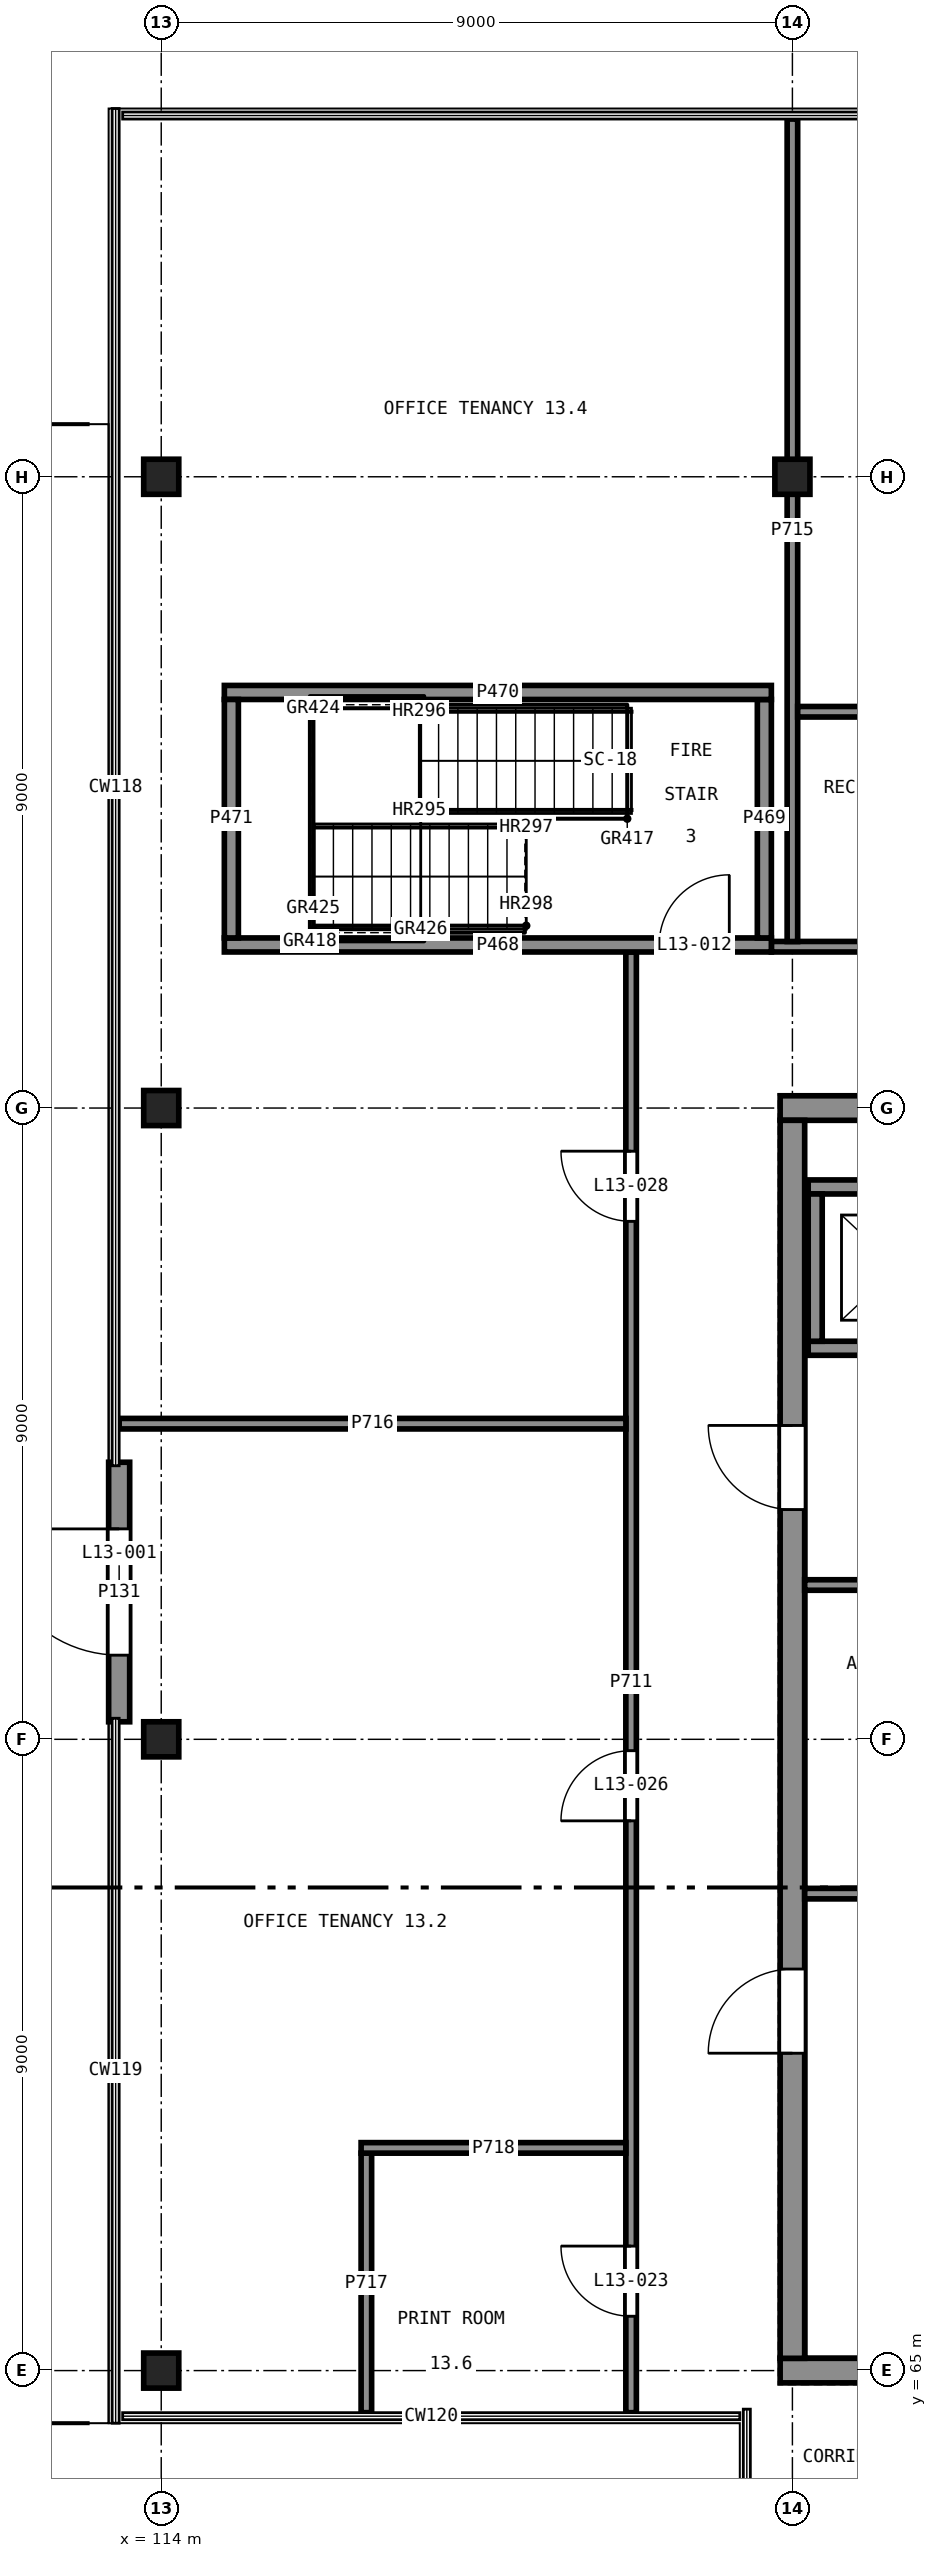
"""IFC4 building model, lengths in metres.
Left out: names, types, materials, properties, quantities, classifications, styles, units other than length and angle.
Written with IfcOpenShell. Run it as: python <this file> out.ifc"""

import sys

from ifc_helpers import new_model, si_unit, direction, frame, frame_2d, origin, origin_2d, place, context, subcontext, project, spatial, rectangle, extrude, element, fill, save


model = new_model("IFC4")
c1 = context("Model", 3, precision=1e-05, world=origin(), true_north=direction((0.0, 1.0)))
c2 = subcontext(c1, "Body", "Model", "MODEL_VIEW")
j1 = project(units=[si_unit("LENGTHUNIT", "METRE"), si_unit("PLANEANGLEUNIT", "RADIAN")], contexts=[c1])
p1 = place(None, origin())
s1 = spatial("IfcSite", under=j1, at=p1, CompositionType="ELEMENT")
p2 = place(p1, origin())
s2 = spatial("IfcBuilding", under=s1, at=p2, CompositionType="ELEMENT")
p3 = place(p2, frame((0.0, 0.0, 53.5)))
s3 = spatial("IfcBuildingStorey", under=s2, at=p3, CompositionType="ELEMENT", Elevation=53.5)
for number, where, z_axis, x_axis in (
    (1, (114.0, 65.0, 0.0), (0.0, 0.0, 1.0), (1.0, 0.0, 0.0)),
    (2, (114.0, 74.0, 0.0), (0.0, 0.0, 1.0), (1.0, 0.0, 0.0)),
    (3, (114.0, 83.0, 0.0), (0.0, 0.0, 1.0), (1.0, 0.0, 0.0)),
    (4, (114.0, 92.0, 0.0), (0.0, 0.0, 1.0), (1.0, 0.0, 0.0)),
    (5, (123.0, 92.0, 0.0), (0.0, 0.0, 1.0), (1.0, 0.0, 0.0)),
):
    element("IfcColumn", number, at=place(p3, frame(where, z_axis=z_axis, x_axis=x_axis)), inside=s3, PredefinedType="COLUMN", context=c2, shape_type="SweptSolid", body=[
        extrude(rectangle(XDim=0.5, YDim=0.5, at=origin_2d()), origin(), (0.0, 0.0, 1.0), 4.0),
    ])
for number, where, z_axis, x_axis in (
    (6, (122.825, 65.0, 0.0), (0.0, 0.0, 1.0), (1.0, 0.0, 0.0)),
    (7, (141.175, 83.0, 0.0), (0.0, 0.0, 1.0), (-1.0, 0.0, 0.0)),
):
    element("IfcWall", number, at=place(p3, frame(where, z_axis=z_axis, x_axis=x_axis)), inside=s3, PredefinedType="SHEAR", context=c2, shape_type="SweptSolid", body=[
        extrude(rectangle(XDim=18.35, YDim=0.35, at=frame_2d((9.175, 0.0))), origin(), (0.0, 0.0, 1.0), 4.0),
    ])
p4 = place(p3, frame((123.0, 82.825, 0.0), z_axis=(0.0, 0.0, 1.0), x_axis=(0.0, -1.0, 0.0)))
e8 = element("IfcWall", 8, at=p4, inside=s3, PredefinedType="SHEAR", context=c2, shape_type="SweptSolid", body=[
    extrude(rectangle(XDim=17.65, YDim=0.35, at=frame_2d((8.825, 0.0))), origin(), (0.0, 0.0, 1.0), 4.0),
])
p5 = place(p4, frame((12.1, 0.0, 0.0)))
e9 = element("IfcOpeningElement", 9, at=p5, cuts=e8, PredefinedType="OPENING", context=c2, shape_type="SweptSolid", body=[
    extrude(rectangle(XDim=1.2, YDim=2.1, at=frame_2d((0.6, 1.05))), frame((0.0, 0.185, 0.0), z_axis=(0.0, -1.0, 0.0), x_axis=(1.0, 0.0, 0.0)), (0.0, 0.0, 1.0), 0.37),
])
p6 = place(p4, frame((4.35, 0.0, 0.0)))
e10 = element("IfcOpeningElement", 10, at=p6, cuts=e8, PredefinedType="OPENING", context=c2, shape_type="SweptSolid", body=[
    extrude(rectangle(XDim=1.2, YDim=2.1, at=frame_2d((0.6, 1.05))), frame((0.0, 0.185, 0.0), z_axis=(0.0, -1.0, 0.0), x_axis=(1.0, 0.0, 0.0)), (0.0, 0.0, 1.0), 0.37),
])
p7 = place(p3, frame((113.4, 77.95, 0.0), z_axis=(0.0, 0.0, 1.0), x_axis=(0.0, -1.0, 0.0)))
e11 = element("IfcWall", 11, at=p7, inside=s3, PredefinedType="SOLIDWALL", context=c2, shape_type="SweptSolid", body=[
    extrude(rectangle(XDim=3.7, YDim=0.3, at=frame_2d((1.85, 0.0))), origin(), (0.0, 0.0, 1.0), 3.75),
])
p8 = place(p7, frame((0.95, 0.0, 0.0)))
e12 = element("IfcOpeningElement", 12, at=p8, cuts=e11, PredefinedType="OPENING", context=c2, shape_type="SweptSolid", body=[
    extrude(rectangle(XDim=1.8, YDim=2.4, at=frame_2d((0.9, 1.2))), frame((0.0, 0.16, 0.0), z_axis=(0.0, -1.0, 0.0), x_axis=(1.0, 0.0, 0.0)), (0.0, 0.0, 1.0), 0.32),
])
p9 = place(p3, frame((123.225, 79.575, 0.0), z_axis=(0.0, 0.0, 1.0), x_axis=(1.0, 0.0, 0.0)))
e13 = element("IfcWall", 13, at=p9, inside=s3, PredefinedType="SHEAR", context=c2, shape_type="SweptSolid", body=[
    extrude(rectangle(XDim=2.55, YDim=0.2, at=frame_2d((1.275, 0.0))), origin(), (0.0, 0.0, 1.0), 4.0),
])
p10 = place(p9, frame((0.725, 0.0, 0.0)))
e14 = element("IfcOpeningElement", 14, at=p10, cuts=e13, PredefinedType="OPENING", context=c2, shape_type="SweptSolid", body=[
    extrude(rectangle(XDim=1.1, YDim=2.1, at=frame_2d((0.55, 1.05))), frame((0.0, 0.11, 0.0), z_axis=(0.0, -1.0, 0.0), x_axis=(1.0, 0.0, 0.0)), (0.0, 0.0, 1.0), 0.22),
])
p11 = place(p3, frame((125.775, 81.875, 0.0), z_axis=(0.0, 0.0, 1.0), x_axis=(-1.0, 0.0, 0.0)))
e15 = element("IfcWall", 15, at=p11, inside=s3, PredefinedType="SHEAR", context=c2, shape_type="SweptSolid", body=[
    extrude(rectangle(XDim=2.55, YDim=0.2, at=frame_2d((1.275, 0.0))), origin(), (0.0, 0.0, 1.0), 4.0),
])
p12 = place(p3, frame((123.325, 81.775, 0.0), z_axis=(0.0, 0.0, 1.0), x_axis=(0.0, -1.0, 0.0)))
e16 = element("IfcWall", 16, at=p12, inside=s3, PredefinedType="SHEAR", context=c2, shape_type="SweptSolid", body=[
    extrude(rectangle(XDim=2.1, YDim=0.2, at=frame_2d((1.05, 0.0))), origin(), (0.0, 0.0, 1.0), 4.0),
])
p13 = place(p3, frame((114.9, 85.325, 0.0), z_axis=(0.0, 0.0, 1.0), x_axis=(1.0, 0.0, 0.0)))
e17 = element("IfcWall", 17, at=p13, inside=s3, PredefinedType="SHEAR", context=c2, shape_type="SweptSolid", body=[
    extrude(rectangle(XDim=7.8, YDim=0.2, at=frame_2d((3.9, 0.0))), origin(), (0.0, 0.0, 1.0), 3.75),
])
p14 = place(p13, frame((6.2, 0.0, 0.0)))
e18 = element("IfcOpeningElement", 18, at=p14, cuts=e17, PredefinedType="OPENING", context=c2, shape_type="SweptSolid", body=[
    extrude(rectangle(XDim=1.0, YDim=2.1, at=frame_2d((0.5, 1.05))), frame((0.0, 0.11, 0.0), z_axis=(0.0, -1.0, 0.0), x_axis=(1.0, 0.0, 0.0)), (0.0, 0.0, 1.0), 0.22),
])
p15 = place(p3, frame((122.6, 85.425, 0.0), z_axis=(0.0, 0.0, 1.0), x_axis=(0.0, 1.0, 0.0)))
e19 = element("IfcWall", 19, at=p15, inside=s3, PredefinedType="SHEAR", context=c2, shape_type="SweptSolid", body=[
    extrude(rectangle(XDim=3.4, YDim=0.2, at=frame_2d((1.7, 0.0))), origin(), (0.0, 0.0, 1.0), 3.75),
])
p16 = place(p3, frame((122.7, 88.925, 0.0), z_axis=(0.0, 0.0, 1.0), x_axis=(-1.0, 0.0, 0.0)))
e20 = element("IfcWall", 20, at=p16, inside=s3, PredefinedType="SHEAR", context=c2, shape_type="SweptSolid", body=[
    extrude(rectangle(XDim=7.8, YDim=0.2, at=frame_2d((3.9, 0.0))), origin(), (0.0, 0.0, 1.0), 3.75),
])
p17 = place(p3, frame((115.0, 88.825, 0.0), z_axis=(0.0, 0.0, 1.0), x_axis=(0.0, -1.0, 0.0)))
e21 = element("IfcWall", 21, at=p17, inside=s3, PredefinedType="SHEAR", context=c2, shape_type="SweptSolid", body=[
    extrude(rectangle(XDim=3.4, YDim=0.2, at=frame_2d((1.7, 0.0))), origin(), (0.0, 0.0, 1.0), 3.75),
])
p18 = place(p3, frame((123.175, 71.8, 0.0), z_axis=(0.0, 0.0, 1.0), x_axis=(1.0, 0.0, 0.0)))
e22 = element("IfcWall", 22, at=p18, inside=s3, PredefinedType="PARTITIONING", context=c2, shape_type="SweptSolid", body=[
    extrude(rectangle(XDim=2.575, YDim=0.15, at=frame_2d((1.288, 0.0))), origin(), (0.0, 0.0, 1.0), 3.75),
])
p19 = place(p18, frame((0.85, 0.0, 0.0)))
e23 = element("IfcOpeningElement", 23, at=p19, cuts=e22, PredefinedType="OPENING", context=c2, shape_type="SweptSolid", body=[
    extrude(rectangle(XDim=1.0, YDim=2.1, at=frame_2d((0.5, 1.05))), frame((0.0, 0.085, 0.0), z_axis=(0.0, -1.0, 0.0), x_axis=(1.0, 0.0, 0.0)), (0.0, 0.0, 1.0), 0.17),
])
p20 = place(p3, frame((123.175, 76.2, 0.0), z_axis=(0.0, 0.0, 1.0), x_axis=(1.0, 0.0, 0.0)))
e24 = element("IfcWall", 24, at=p20, inside=s3, PredefinedType="PARTITIONING", context=c2, shape_type="SweptSolid", body=[
    extrude(rectangle(XDim=2.575, YDim=0.15, at=frame_2d((1.288, 0.0))), origin(), (0.0, 0.0, 1.0), 3.75),
])
p21 = place(p3, frame((120.7, 64.4, 0.0), z_axis=(0.0, 0.0, 1.0), x_axis=(0.0, 1.0, 0.0)))
e25 = element("IfcWall", 25, at=p21, inside=s3, PredefinedType="PARTITIONING", context=c2, shape_type="SweptSolid", body=[
    extrude(rectangle(XDim=20.825, YDim=0.15, at=frame_2d((10.413, 0.0))), origin(), (0.0, 0.0, 1.0), 3.75),
])
p22 = place(p21, frame((1.375, 0.0, 0.0)))
e26 = element("IfcOpeningElement", 26, at=p22, cuts=e25, PredefinedType="OPENING", context=c2, shape_type="SweptSolid", body=[
    extrude(rectangle(XDim=1.0, YDim=2.1, at=frame_2d((0.5, 1.05))), frame((0.0, 0.085, 0.0), z_axis=(0.0, -1.0, 0.0), x_axis=(1.0, 0.0, 0.0)), (0.0, 0.0, 1.0), 0.17),
])
p23 = place(p21, frame((8.438, 0.0, 0.0)))
e27 = element("IfcOpeningElement", 27, at=p23, cuts=e25, PredefinedType="OPENING", context=c2, shape_type="SweptSolid", body=[
    extrude(rectangle(XDim=1.0, YDim=2.1, at=frame_2d((0.5, 1.05))), frame((0.0, 0.085, 0.0), z_axis=(0.0, -1.0, 0.0), x_axis=(1.0, 0.0, 0.0)), (0.0, 0.0, 1.0), 0.17),
])
p24 = place(p21, frame((16.985, 0.0, 0.0)))
e28 = element("IfcOpeningElement", 28, at=p24, cuts=e25, PredefinedType="OPENING", context=c2, shape_type="SweptSolid", body=[
    extrude(rectangle(XDim=1.0, YDim=2.1, at=frame_2d((0.5, 1.05))), frame((0.0, 0.085, 0.0), z_axis=(0.0, -1.0, 0.0), x_axis=(1.0, 0.0, 0.0)), (0.0, 0.0, 1.0), 0.17),
])
p25 = place(p3, frame((122.7, 85.3, 0.0), z_axis=(0.0, 0.0, 1.0), x_axis=(1.0, 0.0, 0.0)))
e29 = element("IfcWall", 29, at=p25, inside=s3, PredefinedType="PARTITIONING", context=c2, shape_type="SweptSolid", body=[
    extrude(rectangle(XDim=9.9, YDim=0.15, at=frame_2d((4.95, 0.0))), origin(), (0.0, 0.0, 1.0), 3.75),
])
p26 = place(p25, frame((1.875, 0.0, 0.0)))
e30 = element("IfcOpeningElement", 30, at=p26, cuts=e29, PredefinedType="OPENING", context=c2, shape_type="SweptSolid", body=[
    extrude(rectangle(XDim=1.0, YDim=2.1, at=frame_2d((0.5, 1.05))), frame((0.0, 0.085, 0.0), z_axis=(0.0, -1.0, 0.0), x_axis=(1.0, 0.0, 0.0)), (0.0, 0.0, 1.0), 0.17),
])
p27 = place(p25, frame((6.698, 0.0, 0.0)))
e31 = element("IfcOpeningElement", 31, at=p27, cuts=e29, PredefinedType="OPENING", context=c2, shape_type="SweptSolid", body=[
    extrude(rectangle(XDim=1.0, YDim=2.1, at=frame_2d((0.5, 1.05))), frame((0.0, 0.085, 0.0), z_axis=(0.0, -1.0, 0.0), x_axis=(1.0, 0.0, 0.0)), (0.0, 0.0, 1.0), 0.17),
])
p28 = place(p3, frame((123.0, 85.374, 0.0), z_axis=(0.0, 0.0, 1.0), x_axis=(0.0, 1.0, 0.0)))
e32 = element("IfcWall", 32, at=p28, inside=s3, PredefinedType="PARTITIONING", context=c2, shape_type="SweptSolid", body=[
    extrude(rectangle(XDim=11.726, YDim=0.15, at=frame_2d((5.863, 0.0))), origin(), (0.0, 0.0, 1.0), 2.85),
])
p29 = place(p3, frame((113.4, 78.5, 0.0), z_axis=(0.0, 0.0, 1.0), x_axis=(1.0, 0.0, 0.0)))
e33 = element("IfcWall", 33, at=p29, inside=s3, PredefinedType="PARTITIONING", context=c2, shape_type="SweptSolid", body=[
    extrude(rectangle(XDim=7.226, YDim=0.15, at=frame_2d((3.613, 0.0))), origin(), (0.0, 0.0, 1.0), 3.75),
])
p30 = place(p3, frame((116.925, 64.4, 0.0), z_axis=(0.0, 0.0, 1.0), x_axis=(0.0, 1.0, 0.0)))
e34 = element("IfcWall", 34, at=p30, inside=s3, PredefinedType="PARTITIONING", context=c2, shape_type="SweptSolid", body=[
    extrude(rectangle(XDim=3.7, YDim=0.15, at=frame_2d((1.85, 0.0))), origin(), (0.0, 0.0, 1.0), 3.75),
])
p31 = place(p3, frame((120.625, 68.175, 0.0), z_axis=(0.0, 0.0, 1.0), x_axis=(-1.0, 0.0, 0.0)))
e35 = element("IfcWall", 35, at=p31, inside=s3, PredefinedType="PARTITIONING", context=c2, shape_type="SweptSolid", body=[
    extrude(rectangle(XDim=3.775, YDim=0.15, at=frame_2d((1.887, 0.0))), origin(), (0.0, 0.0, 1.0), 3.75),
])
p32 = place(p3, frame((123.075, 88.65, 0.0), z_axis=(0.0, 0.0, 1.0), x_axis=(1.0, 0.0, 0.0)))
e36 = element("IfcWall", 36, at=p32, inside=s3, PredefinedType="PARTITIONING", context=c2, shape_type="SweptSolid", body=[
    extrude(rectangle(XDim=4.0, YDim=0.15, at=frame_2d((2.0, 0.0))), origin(), (0.0, 0.0, 1.0), 3.75),
])
p33 = place(p8, frame((1.8, 0.0, 0.0), z_axis=(0.0, 0.0, 1.0), x_axis=(-1.0, 0.0, 0.0)))
e37 = element("IfcDoor", 37, at=p33, inside=s3, OperationType="DOUBLE_DOOR_SINGLE_SWING", PredefinedType="DOOR", context=c2, shape_type="SweptSolid", body=[
    extrude(rectangle(XDim=1.8, YDim=2.4, at=frame_2d((0.9, 1.2))), frame((0.0, 0.025, 0.0), z_axis=(0.0, -1.0, 0.0), x_axis=(1.0, 0.0, 0.0)), (0.0, 0.0, 1.0), 0.05),
])
fill(e12, e37)
p34 = place(p14, origin())
e38 = element("IfcDoor", 38, at=p34, inside=s3, OperationType="SINGLE_SWING_LEFT", PredefinedType="DOOR", context=c2, shape_type="SweptSolid", body=[
    extrude(rectangle(XDim=1.0, YDim=2.1, at=frame_2d((0.5, 1.05))), frame((0.0, 0.025, 0.0), z_axis=(0.0, -1.0, 0.0), x_axis=(1.0, 0.0, 0.0)), (0.0, 0.0, 1.0), 0.05),
])
fill(e18, e38)
p35 = place(p5, frame((1.2, 0.0, 0.0), z_axis=(0.0, 0.0, 1.0), x_axis=(-1.0, 0.0, 0.0)))
e39 = element("IfcDoor", 39, at=p35, inside=s3, OperationType="SINGLE_SWING_RIGHT", PredefinedType="DOOR", context=c2, shape_type="SweptSolid", body=[
    extrude(rectangle(XDim=1.2, YDim=2.1, at=frame_2d((0.6, 1.05))), frame((0.0, 0.025, 0.0), z_axis=(0.0, -1.0, 0.0), x_axis=(1.0, 0.0, 0.0)), (0.0, 0.0, 1.0), 0.05),
])
fill(e9, e39)
p36 = place(p6, frame((1.2, 0.0, 0.0), z_axis=(0.0, 0.0, 1.0), x_axis=(-1.0, 0.0, 0.0)))
e40 = element("IfcDoor", 40, at=p36, inside=s3, OperationType="SINGLE_SWING_LEFT", PredefinedType="DOOR", context=c2, shape_type="SweptSolid", body=[
    extrude(rectangle(XDim=1.2, YDim=2.1, at=frame_2d((0.6, 1.05))), frame((0.0, 0.025, 0.0), z_axis=(0.0, -1.0, 0.0), x_axis=(1.0, 0.0, 0.0)), (0.0, 0.0, 1.0), 0.05),
])
fill(e10, e40)
p37 = place(p22, origin())
e41 = element("IfcDoor", 41, at=p37, inside=s3, OperationType="SINGLE_SWING_LEFT", PredefinedType="DOOR", context=c2, shape_type="SweptSolid", body=[
    extrude(rectangle(XDim=1.0, YDim=2.1, at=frame_2d((0.5, 1.05))), frame((0.0, 0.025, 0.0), z_axis=(0.0, -1.0, 0.0), x_axis=(1.0, 0.0, 0.0)), (0.0, 0.0, 1.0), 0.05),
])
fill(e26, e41)
p38 = place(p23, origin())
e42 = element("IfcDoor", 42, at=p38, inside=s3, OperationType="SINGLE_SWING_RIGHT", PredefinedType="DOOR", context=c2, shape_type="SweptSolid", body=[
    extrude(rectangle(XDim=1.0, YDim=2.1, at=frame_2d((0.5, 1.05))), frame((0.0, 0.025, 0.0), z_axis=(0.0, -1.0, 0.0), x_axis=(1.0, 0.0, 0.0)), (0.0, 0.0, 1.0), 0.05),
])
fill(e27, e42)
p39 = place(p24, origin())
e43 = element("IfcDoor", 43, at=p39, inside=s3, OperationType="SINGLE_SWING_LEFT", PredefinedType="DOOR", context=c2, shape_type="SweptSolid", body=[
    extrude(rectangle(XDim=1.0, YDim=2.1, at=frame_2d((0.5, 1.05))), frame((0.0, 0.025, 0.0), z_axis=(0.0, -1.0, 0.0), x_axis=(1.0, 0.0, 0.0)), (0.0, 0.0, 1.0), 0.05),
])
fill(e28, e43)
save(model, sys.argv[1])
